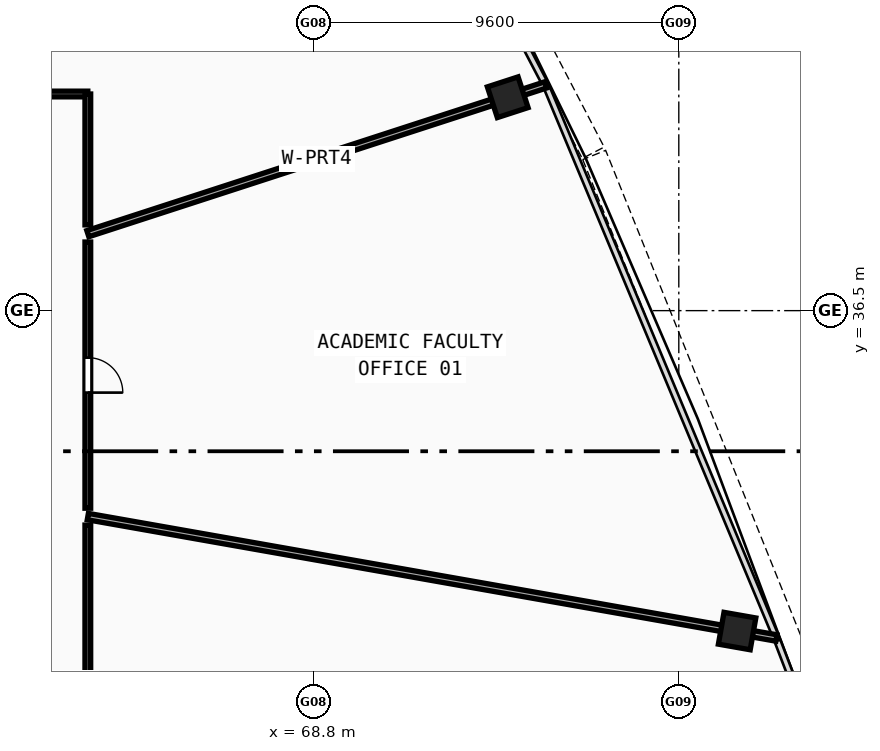
"""IFC4 building model, lengths in metres.
Left out: names, types, materials, properties, quantities, classifications, styles, units other than length and angle.
Written with IfcOpenShell. Run it as: python <this file> out.ifc"""

import sys

from ifc_helpers import new_model, si_unit, direction, frame, frame_2d, origin, origin_with_axes, origin_2d, place, context, subcontext, project, spatial, rectangle, hollow_rectangle, extrude, source, transform, mapped, element, fill, save


model = new_model("IFC4")
c1 = context("Model", 3, precision=1e-05, world=origin(), true_north=direction((0.0, 1.0)))
c2 = subcontext(c1, "Body", "Model", "MODEL_VIEW")
j1 = project(units=[si_unit("LENGTHUNIT", "METRE"), si_unit("PLANEANGLEUNIT", "RADIAN")], contexts=[c1])
p1 = place(None, origin())
s1 = spatial("IfcSite", under=j1, at=p1, CompositionType="ELEMENT")
p2 = place(p1, origin())
s2 = spatial("IfcBuilding", under=s1, at=p2, CompositionType="ELEMENT")
p3 = place(p2, frame((0.0, 0.0, 266.91)))
s3 = spatial("IfcBuildingStorey", under=s2, at=p3, CompositionType="ELEMENT", Elevation=266.91)
m1 = source(origin(), c2, "Body", "SweptSolid", [
    extrude(hollow_rectangle(XDim=0.85, YDim=0.85, WallThickness=0.034, at=origin_2d()), origin(), (0.0, 0.0, 1.0), 5.83),
])
for number, where, z_axis, x_axis in (
    (1, (79.934, 28.069, -0.26), (0.0, 0.0, 1.0), (0.174, 0.985, 0.0)),
    (2, (73.899, 42.115, -0.26), (0.0, 0.0, 1.0), (-0.309, 0.951, 0.0)),
):
    element("IfcColumn", number, at=place(p3, frame(where, z_axis=z_axis, x_axis=x_axis)), inside=s3, PredefinedType="COLUMN", context=c2, shape_type="MappedRepresentation", body=[
        mapped(m1, transform((0.0, 0.0, 0.0), scale=1.0)),
    ])
p4 = place(p3, frame((62.85, 38.525, 0.0), z_axis=(0.0, 0.0, 1.0), x_axis=(0.951057436246, 0.309014163043, 0.0)))
e3 = element("IfcWall", 3, at=p4, inside=s3, PredefinedType="PARTITIONING", context=c2, shape_type="SweptSolid", body=[
    extrude(rectangle(XDim=12.667, YDim=0.17, at=frame_2d((6.333, 0.0))), origin(), (0.0, 0.0, 1.0), 2.22),
])
p5 = place(p3, frame((51.784, 42.2, 0.0), z_axis=(0.0, 0.0, 1.0), x_axis=(0.406737985753, 0.913544859843, 0.0)))
e4 = element("IfcWall", 4, at=p5, inside=s3, PredefinedType="PARTITIONING", context=c2, shape_type="SweptSolid", body=[
    extrude(rectangle(XDim=24.707, YDim=0.17, at=frame_2d((12.354, 0.0))), origin(), (0.0, 0.0, 1.0), 2.22),
])
p6 = place(p3, frame((62.85, 31.082, 0.0), z_axis=(0.0, 0.0, 1.0), x_axis=(0.984806394916, -0.173655879639, 0.0)))
e5 = element("IfcWall", 5, at=p6, inside=s3, PredefinedType="PARTITIONING", context=c2, shape_type="SweptSolid", body=[
    extrude(rectangle(XDim=18.397, YDim=0.17, at=frame_2d((9.199, 0.0))), origin(), (0.0, 0.0, 1.0), 2.22),
])
p7 = place(p3, frame((52.025, 42.2, 0.0), z_axis=(0.0, 0.0, 1.0), x_axis=(1.0, 0.0, 0.0)))
e6 = element("IfcWall", 6, at=p7, inside=s3, PredefinedType="PARTITIONING", context=c2, shape_type="SweptSolid", body=[
    extrude(rectangle(XDim=10.825, YDim=0.15, at=frame_2d((5.413, 0.0))), origin(), (0.0, 0.0, 1.0), 2.22),
])
p8 = place(p7, frame((5.047, 0.0, 0.0)))
e7 = element("IfcOpeningElement", 7, at=p8, cuts=e6, PredefinedType="OPENING", context=c2, shape_type="SweptSolid", body=[
    extrude(rectangle(XDim=0.98, YDim=2.12, at=frame_2d((0.49, 1.06))), frame((0.0, 0.085, 0.0), z_axis=(0.0, -1.0, 0.0), x_axis=(1.0, 0.0, 0.0)), (0.0, 0.0, 1.0), 0.17),
])
p9 = place(p3, frame((62.85, 42.2, 0.0), z_axis=(0.0, 0.0, 1.0), x_axis=(0.0, -1.0, 0.0)))
e8 = element("IfcWall", 8, at=p9, inside=s3, PredefinedType="PARTITIONING", context=c2, shape_type="SweptSolid", body=[
    extrude(rectangle(XDim=3.444, YDim=0.15, at=frame_2d((1.722, 0.0))), origin(), (0.0, 0.0, 1.0), 2.22),
])
p10 = place(p3, frame((62.85, 38.305, 0.0), z_axis=(0.0, 0.0, 1.0), x_axis=(0.0, -1.0, 0.0)))
e9 = element("IfcWall", 9, at=p10, inside=s3, PredefinedType="PARTITIONING", context=c2, shape_type="SweptSolid", body=[
    extrude(rectangle(XDim=7.004, YDim=0.15, at=frame_2d((3.502, 0.0))), origin(), (0.0, 0.0, 1.0), 2.22),
])
p11 = place(p10, frame((3.042, 0.0, 0.0)))
e10 = element("IfcOpeningElement", 10, at=p11, cuts=e9, PredefinedType="OPENING", context=c2, shape_type="SweptSolid", body=[
    extrude(rectangle(XDim=0.92, YDim=2.1, at=frame_2d((0.46, 1.05))), frame((0.0, 0.085, 0.0), z_axis=(0.0, -1.0, 0.0), x_axis=(1.0, 0.0, 0.0)), (0.0, 0.0, 1.0), 0.17),
])
p12 = place(p3, frame((62.85, 30.858, 0.0), z_axis=(0.0, 0.0, 1.0), x_axis=(0.0, -1.0, 0.0)))
e11 = element("IfcWall", 11, at=p12, inside=s3, PredefinedType="PARTITIONING", context=c2, shape_type="SweptSolid", body=[
    extrude(rectangle(XDim=5.958, YDim=0.15, at=frame_2d((2.979, 0.0))), origin(), (0.0, 0.0, 1.0), 2.22),
])
m2 = source(origin(), c2, "Body", "SweptSolid", [
    extrude(rectangle(XDim=0.92, YDim=2.1, at=frame_2d((0.46, 1.05))), frame((0.0, 0.025, 0.0), z_axis=(0.0, -1.0, 0.0), x_axis=(1.0, 0.0, 0.0)), (0.0, 0.0, 1.0), 0.05),
])
p13 = place(p11, origin_with_axes())
e12 = element("IfcDoor", 12, at=p13, inside=s3, OperationType="SINGLE_SWING_RIGHT", PredefinedType="DOOR", context=c2, shape_type="MappedRepresentation", body=[
    mapped(m2, transform((0.0, 0.0, 0.0), scale=1.0)),
])
fill(e10, e12)
save(model, sys.argv[1])
